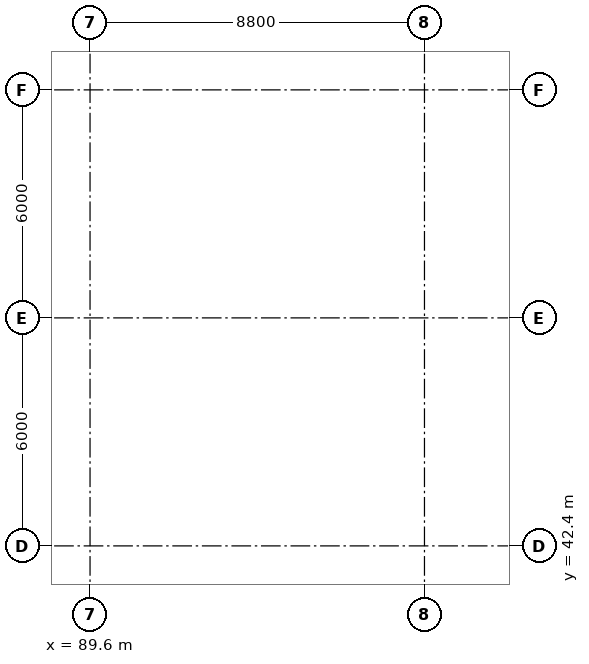
"""IFC4 building model, lengths in metres.
Left out: names, types, materials, properties, quantities, classifications, styles, units other than length and angle.
Written with IfcOpenShell. Run it as: python <this file> out.ifc"""

import sys

from ifc_helpers import new_model, si_unit, direction, frame, frame_2d, origin, origin_2d, place, context, subcontext, project, spatial, rectangle, extrude, element, fill, save


model = new_model("IFC4")
c1 = context("Model", 3, precision=1e-05, world=origin(), true_north=direction((0.0, 1.0)))
c2 = subcontext(c1, "Body", "Model", "MODEL_VIEW")
j1 = project(units=[si_unit("LENGTHUNIT", "METRE"), si_unit("PLANEANGLEUNIT", "RADIAN")], contexts=[c1])
p1 = place(None, origin())
s1 = spatial("IfcSite", under=j1, at=p1, CompositionType="ELEMENT")
p2 = place(p1, origin())
s2 = spatial("IfcBuilding", under=s1, at=p2, CompositionType="ELEMENT")
p3 = place(p2, frame((0.0, 0.0, 10.0)))
s3 = spatial("IfcBuildingStorey", under=s2, at=p3, CompositionType="ELEMENT", Elevation=10.0)
for number, where, z_axis, x_axis in (
    (1, (99.4, 42.4, 0.0), (0.0, 0.0, 1.0), (1.0, 0.0, 0.0)),
    (2, (99.4, 48.4, 0.0), (0.0, 0.0, 1.0), (1.0, 0.0, 0.0)),
    (3, (99.4, 54.4, 0.0), (0.0, 0.0, 1.0), (1.0, 0.0, 0.0)),
):
    element("IfcColumn", number, at=place(p3, frame(where, z_axis=z_axis, x_axis=x_axis)), inside=s3, PredefinedType="COLUMN", context=c2, shape_type="SweptSolid", body=[
        extrude(rectangle(XDim=1.2, YDim=1.2, at=origin_2d()), origin(), (0.0, 0.0, 1.0), 4.2),
    ])
for number, where, z_axis, x_axis in (
    (4, (89.675, 42.4, 0.0), (0.0, 0.0, 1.0), (1.0, 0.0, 0.0)),
    (5, (89.675, 54.4, 0.0), (0.0, 0.0, 1.0), (1.0, 0.0, 0.0)),
):
    element("IfcWall", number, at=place(p3, frame(where, z_axis=z_axis, x_axis=x_axis)), inside=s3, PredefinedType="PARTITIONING", context=c2, shape_type="SweptSolid", body=[
        extrude(rectangle(XDim=9.125, YDim=0.1, at=frame_2d((4.562, 0.0))), origin(), (0.0, 0.0, 1.0), 3.66),
    ])
p4 = place(p3, frame((89.6, 36.505, 0.0), z_axis=(0.0, 0.0, 1.0), x_axis=(0.0, 1.0, 0.0)))
e6 = element("IfcWall", 6, at=p4, inside=s3, PredefinedType="PARTITIONING", context=c2, shape_type="SweptSolid", body=[
    extrude(rectangle(XDim=5.789, YDim=0.15, at=frame_2d((2.895, 0.0))), origin(), (0.0, 0.0, 1.0), 4.2),
])
p5 = place(p4, frame((0.245, 0.0, 0.0)))
e7 = element("IfcOpeningElement", 7, at=p5, cuts=e6, PredefinedType="OPENING", context=c2, shape_type="SweptSolid", body=[
    extrude(rectangle(XDim=1.8, YDim=2.1, at=frame_2d((0.9, 1.05))), frame((0.0, 0.085, 0.0), z_axis=(0.0, -1.0, 0.0), x_axis=(1.0, 0.0, 0.0)), (0.0, 0.0, 1.0), 0.17),
])
p6 = place(p3, frame((89.6, 42.295, 0.0), z_axis=(0.0, 0.0, 1.0), x_axis=(0.0, 1.0, 0.0)))
e8 = element("IfcWall", 8, at=p6, inside=s3, PredefinedType="PARTITIONING", context=c2, shape_type="SweptSolid", body=[
    extrude(rectangle(XDim=0.211, YDim=0.15, at=frame_2d((0.105, 0.0))), origin(), (0.0, 0.0, 1.0), 3.66),
])
p7 = place(p3, frame((89.6, 42.505, 0.0), z_axis=(0.0, 0.0, 1.0), x_axis=(0.0, 1.0, 0.0)))
e9 = element("IfcWall", 9, at=p7, inside=s3, PredefinedType="PARTITIONING", context=c2, shape_type="SweptSolid", body=[
    extrude(rectangle(XDim=5.789, YDim=0.15, at=frame_2d((2.895, 0.0))), origin(), (0.0, 0.0, 1.0), 4.2),
])
p8 = place(p3, frame((89.6, 48.295, 0.0), z_axis=(0.0, 0.0, 1.0), x_axis=(0.0, 1.0, 0.0)))
e10 = element("IfcWall", 10, at=p8, inside=s3, PredefinedType="PARTITIONING", context=c2, shape_type="SweptSolid", body=[
    extrude(rectangle(XDim=0.211, YDim=0.15, at=frame_2d((0.105, 0.0))), origin(), (0.0, 0.0, 1.0), 3.66),
])
p9 = place(p3, frame((89.6, 48.505, 0.0), z_axis=(0.0, 0.0, 1.0), x_axis=(0.0, 1.0, 0.0)))
e11 = element("IfcWall", 11, at=p9, inside=s3, PredefinedType="PARTITIONING", context=c2, shape_type="SweptSolid", body=[
    extrude(rectangle(XDim=5.789, YDim=0.15, at=frame_2d((2.895, 0.0))), origin(), (0.0, 0.0, 1.0), 4.2),
])
p10 = place(p9, frame((0.245, 0.0, 0.0)))
e12 = element("IfcOpeningElement", 12, at=p10, cuts=e11, PredefinedType="OPENING", context=c2, shape_type="SweptSolid", body=[
    extrude(rectangle(XDim=1.8, YDim=2.1, at=frame_2d((0.9, 1.05))), frame((0.0, 0.085, 0.0), z_axis=(0.0, -1.0, 0.0), x_axis=(1.0, 0.0, 0.0)), (0.0, 0.0, 1.0), 0.17),
])
p11 = place(p3, frame((89.6, 54.295, 0.0), z_axis=(0.0, 0.0, 1.0), x_axis=(0.0, 1.0, 0.0)))
e13 = element("IfcWall", 13, at=p11, inside=s3, PredefinedType="PARTITIONING", context=c2, shape_type="SweptSolid", body=[
    extrude(rectangle(XDim=0.206, YDim=0.15, at=frame_2d((0.103, 0.0))), origin(), (0.0, 0.0, 1.0), 3.66),
])
p12 = place(p3, frame((89.6, 54.505, 0.0), z_axis=(0.0, 0.0, 1.0), x_axis=(0.0, 1.0, 0.0)))
e14 = element("IfcWall", 14, at=p12, inside=s3, PredefinedType="PARTITIONING", context=c2, shape_type="SweptSolid", body=[
    extrude(rectangle(XDim=5.82, YDim=0.15, at=frame_2d((2.91, 0.0))), origin(), (0.0, 0.0, 1.0), 3.66),
])
p13 = place(p12, frame((2.395, 0.0, 0.0)))
e15 = element("IfcOpeningElement", 15, at=p13, cuts=e14, PredefinedType="OPENING", context=c2, shape_type="SweptSolid", body=[
    extrude(rectangle(XDim=1.0, YDim=2.1, at=frame_2d((0.5, 1.05))), frame((0.0, 0.085, 0.0), z_axis=(0.0, -1.0, 0.0), x_axis=(1.0, 0.0, 0.0)), (0.0, 0.0, 1.0), 0.17),
])
p14 = place(p10, origin())
e16 = element("IfcDoor", 16, at=p14, inside=s3, OperationType="DOUBLE_DOOR_SINGLE_SWING", PredefinedType="DOOR", context=c2, shape_type="SweptSolid", body=[
    extrude(rectangle(XDim=1.8, YDim=2.1, at=frame_2d((0.9, 1.05))), frame((0.0, 0.025, 0.0), z_axis=(0.0, -1.0, 0.0), x_axis=(1.0, 0.0, 0.0)), (0.0, 0.0, 1.0), 0.05),
])
fill(e12, e16)
save(model, sys.argv[1])
